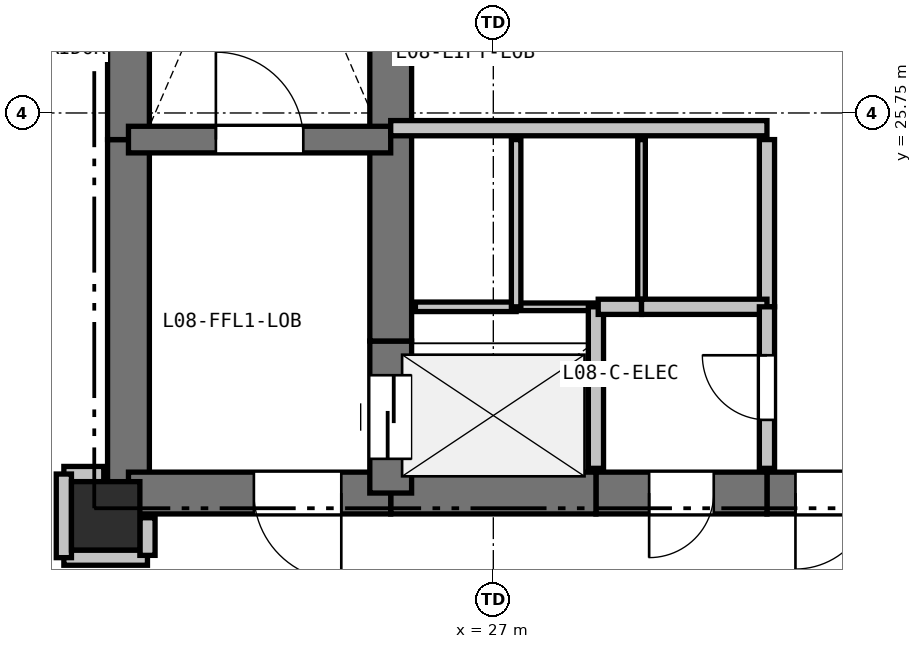
"""IFC4 building model, lengths in metres.
Left out: names, types, materials, properties, quantities, classifications, styles, units other than length and angle.
Written with IfcOpenShell. Run it as: python <this file> out.ifc"""

import sys

from ifc_helpers import new_model, si_unit, direction, frame, frame_2d, origin, origin_2d, place, context, subcontext, project, spatial, rectangle, extrude, element, fill, save


model = new_model("IFC4")
c1 = context("Model", 3, precision=1e-05, world=origin(), true_north=direction((0.0, 1.0)))
c2 = subcontext(c1, "Body", "Model", "MODEL_VIEW")
j1 = project(units=[si_unit("LENGTHUNIT", "METRE"), si_unit("PLANEANGLEUNIT", "RADIAN")], contexts=[c1])
p1 = place(None, origin())
s1 = spatial("IfcSite", under=j1, at=p1, CompositionType="ELEMENT")
p2 = place(p1, origin())
s2 = spatial("IfcBuilding", under=s1, at=p2, CompositionType="ELEMENT")
p3 = place(p2, frame((0.0, 0.0, 32.4)))
s3 = spatial("IfcBuildingStorey", under=s2, at=p3, CompositionType="ELEMENT", Elevation=32.4)
p4 = place(p3, frame((21.9, 20.45, 0.0), z_axis=(0.0, 0.0, 1.0), x_axis=(1.0, 0.0, 0.0)))
e1 = element("IfcColumn", 1, at=p4, inside=s3, PredefinedType="COLUMN", context=c2, shape_type="SweptSolid", body=[
    extrude(rectangle(XDim=0.9, YDim=0.9, at=origin_2d()), origin(), (0.0, 0.0, 1.0), 3.3),
])
p5 = place(p3, frame((22.2, 20.75, 0.0), z_axis=(0.0, 0.0, 1.0), x_axis=(0.0, 1.0, 0.0)))
e2 = element("IfcWall", 2, at=p5, inside=s3, PredefinedType="SHEAR", context=c2, shape_type="SweptSolid", body=[
    extrude(rectangle(XDim=4.65, YDim=0.55, at=frame_2d((2.325, 0.0))), origin(), (0.0, 0.0, 1.0), 3.04),
])
p6 = place(p3, frame((22.2, 25.4, 0.0), z_axis=(0.0, 0.0, 1.0), x_axis=(0.0, 1.0, 0.0)))
e3 = element("IfcWall", 3, at=p6, inside=s3, PredefinedType="SHEAR", context=c2, shape_type="SweptSolid", body=[
    extrude(rectangle(XDim=7.35, YDim=0.55, at=frame_2d((3.675, 0.0))), origin(), (0.0, 0.0, 1.0), 3.04),
])
p7 = place(p3, frame((32.35, 20.75, 0.0), z_axis=(0.0, 0.0, 1.0), x_axis=(-1.0, 0.0, 0.0)))
e4 = element("IfcWall", 4, at=p7, inside=s3, PredefinedType="SHEAR", context=c2, shape_type="SweptSolid", body=[
    extrude(rectangle(XDim=1.75, YDim=0.55, at=frame_2d((0.875, 0.0))), origin(), (0.0, 0.0, 1.0), 3.04),
])
p8 = place(p7, frame((0.375, 0.0, 0.0)))
e5 = element("IfcOpeningElement", 5, at=p8, cuts=e4, PredefinedType="OPENING", context=c2, shape_type="SweptSolid", body=[
    extrude(rectangle(XDim=1.0, YDim=2.15, at=frame_2d((0.5, 1.075))), frame((0.0, 0.285, 0.0), z_axis=(0.0, -1.0, 0.0), x_axis=(1.0, 0.0, 0.0)), (0.0, 0.0, 1.0), 0.57),
])
p9 = place(p3, frame((30.6, 20.75, 0.0), z_axis=(0.0, 0.0, 1.0), x_axis=(-1.0, 0.0, 0.0)))
e6 = element("IfcWall", 6, at=p9, inside=s3, PredefinedType="SHEAR", context=c2, shape_type="SweptSolid", body=[
    extrude(rectangle(XDim=2.25, YDim=0.55, at=frame_2d((1.125, 0.0))), origin(), (0.0, 0.0, 1.0), 3.04),
])
p10 = place(p9, frame((0.7, 0.0, 0.0)))
e7 = element("IfcOpeningElement", 7, at=p10, cuts=e6, PredefinedType="OPENING", context=c2, shape_type="SweptSolid", body=[
    extrude(rectangle(XDim=0.85, YDim=2.1, at=frame_2d((0.425, 1.05))), frame((0.0, 0.285, 0.0), z_axis=(0.0, -1.0, 0.0), x_axis=(1.0, 0.0, 0.0)), (0.0, 0.0, 1.0), 0.57),
])
p11 = place(p3, frame((28.35, 20.75, 0.0), z_axis=(0.0, 0.0, 1.0), x_axis=(-1.0, 0.0, 0.0)))
e8 = element("IfcWall", 8, at=p11, inside=s3, PredefinedType="SHEAR", context=c2, shape_type="SweptSolid", body=[
    extrude(rectangle(XDim=2.7, YDim=0.55, at=frame_2d((1.35, 0.0))), origin(), (0.0, 0.0, 1.0), 3.04),
])
p12 = place(p3, frame((25.65, 20.75, 0.0), z_axis=(0.0, 0.0, 1.0), x_axis=(-1.0, 0.0, 0.0)))
e9 = element("IfcWall", 9, at=p12, inside=s3, PredefinedType="SHEAR", context=c2, shape_type="SweptSolid", body=[
    extrude(rectangle(XDim=3.45, YDim=0.55, at=frame_2d((1.725, 0.0))), origin(), (0.0, 0.0, 1.0), 3.04),
])
p13 = place(p12, frame((0.65, 0.0, 0.0)))
e10 = element("IfcOpeningElement", 10, at=p13, cuts=e9, PredefinedType="OPENING", context=c2, shape_type="SweptSolid", body=[
    extrude(rectangle(XDim=1.15, YDim=2.15, at=frame_2d((0.575, 1.075))), frame((0.0, 0.285, 0.0), z_axis=(0.0, -1.0, 0.0), x_axis=(1.0, 0.0, 0.0)), (0.0, 0.0, 1.0), 0.57),
])
p14 = place(p3, frame((25.65, 20.75, 0.0), z_axis=(0.0, 0.0, 1.0), x_axis=(0.0, 1.0, 0.0)))
e11 = element("IfcWall", 11, at=p14, inside=s3, PredefinedType="SHEAR", context=c2, shape_type="SweptSolid", body=[
    extrude(rectangle(XDim=2.0, YDim=0.55, at=frame_2d((1.0, 0.0))), origin(), (0.0, 0.0, 1.0), 3.04),
])
p15 = place(p14, frame((0.45, 0.0, 0.0)))
e12 = element("IfcOpeningElement", 12, at=p15, cuts=e11, PredefinedType="OPENING", context=c2, shape_type="SweptSolid", body=[
    extrude(rectangle(XDim=1.1, YDim=2.15, at=frame_2d((0.55, 1.075))), frame((0.0, 0.285, 0.0), z_axis=(0.0, -1.0, 0.0), x_axis=(1.0, 0.0, 0.0)), (0.0, 0.0, 1.0), 0.57),
])
p16 = place(p3, frame((25.65, 22.75, 0.0), z_axis=(0.0, 0.0, 1.0), x_axis=(0.0, 1.0, 0.0)))
e13 = element("IfcWall", 13, at=p16, inside=s3, PredefinedType="SHEAR", context=c2, shape_type="SweptSolid", body=[
    extrude(rectangle(XDim=2.8, YDim=0.55, at=frame_2d((1.4, 0.0))), origin(), (0.0, 0.0, 1.0), 3.04),
])
p17 = place(p3, frame((25.65, 25.55, 0.0), z_axis=(0.0, 0.0, 1.0), x_axis=(0.0, 1.0, 0.0)))
e14 = element("IfcWall", 14, at=p17, inside=s3, PredefinedType="SHEAR", context=c2, shape_type="SweptSolid", body=[
    extrude(rectangle(XDim=2.4, YDim=0.55, at=frame_2d((1.2, 0.0))), origin(), (0.0, 0.0, 1.0), 3.04),
])
p18 = place(p3, frame((22.2, 25.4, 0.0), z_axis=(0.0, 0.0, 1.0), x_axis=(1.0, 0.0, 0.0)))
e15 = element("IfcWall", 15, at=p18, inside=s3, PredefinedType="SHEAR", context=c2, shape_type="SweptSolid", body=[
    extrude(rectangle(XDim=3.45, YDim=0.35, at=frame_2d((1.725, 0.0))), origin(), (0.0, 0.0, 1.0), 3.04),
])
p19 = place(p18, frame((1.15, 0.0, 0.0)))
e16 = element("IfcOpeningElement", 16, at=p19, cuts=e15, PredefinedType="OPENING", context=c2, shape_type="SweptSolid", body=[
    extrude(rectangle(XDim=1.15, YDim=2.15, at=frame_2d((0.575, 1.075))), frame((0.0, 0.185, 0.0), z_axis=(0.0, -1.0, 0.0), x_axis=(1.0, 0.0, 0.0)), (0.0, 0.0, 1.0), 0.37),
])
p20 = place(p3, frame((25.65, 25.55, 0.0), z_axis=(0.0, 0.0, 1.0), x_axis=(1.0, 0.0, 0.0)))
e17 = element("IfcWall", 17, at=p20, inside=s3, PredefinedType="PARTITIONING", context=c2, shape_type="SweptSolid", body=[
    extrude(rectangle(XDim=4.95, YDim=0.2, at=frame_2d((2.475, 0.0))), origin(), (0.0, 0.0, 1.0), 3.04),
])
p21 = place(p3, frame((25.975, 23.2, 0.0), z_axis=(0.0, 0.0, 1.0), x_axis=(1.0, 0.0, 0.0)))
e18 = element("IfcWall", 18, at=p21, inside=s3, PredefinedType="PARTITIONING", context=c2, shape_type="SweptSolid", body=[
    extrude(rectangle(XDim=1.325, YDim=0.125, at=frame_2d((0.663, 0.0))), origin(), (0.0, 0.0, 1.0), 3.04),
])
p22 = place(p3, frame((27.3, 23.2, 0.0), z_axis=(0.0, 0.0, 1.0), x_axis=(1.0, 0.0, 0.0)))
e19 = element("IfcWall", 19, at=p22, inside=s3, PredefinedType="PARTITIONING", context=c2, shape_type="SweptSolid", body=[
    extrude(rectangle(XDim=1.05, YDim=0.1, at=frame_2d((0.525, 0.0))), origin(), (0.0, 0.0, 1.0), 3.04),
])
p23 = place(p3, frame((28.35, 23.2, 0.0), z_axis=(0.0, 0.0, 1.0), x_axis=(0.0, -1.0, 0.0)))
e20 = element("IfcWall", 20, at=p23, inside=s3, PredefinedType="PARTITIONING", context=c2, shape_type="SweptSolid", body=[
    extrude(rectangle(XDim=2.125, YDim=0.2, at=frame_2d((1.062, 0.0))), origin(), (0.0, 0.0, 1.0), 3.04),
])
p24 = place(p3, frame((27.3, 25.4, 0.0), z_axis=(0.0, 0.0, 1.0), x_axis=(0.0, -1.0, 0.0)))
e21 = element("IfcWall", 21, at=p24, inside=s3, PredefinedType="PARTITIONING", context=c2, shape_type="SweptSolid", body=[
    extrude(rectangle(XDim=2.2, YDim=0.125, at=frame_2d((1.1, 0.0))), origin(), (0.0, 0.0, 1.0), 3.04),
])
p25 = place(p3, frame((28.95, 25.4, 0.0), z_axis=(0.0, 0.0, 1.0), x_axis=(0.0, -1.0, 0.0)))
e22 = element("IfcWall", 22, at=p25, inside=s3, PredefinedType="PARTITIONING", context=c2, shape_type="SweptSolid", body=[
    extrude(rectangle(XDim=2.2, YDim=0.1, at=frame_2d((1.1, 0.0))), origin(), (0.0, 0.0, 1.0), 3.04),
])
p26 = place(p3, frame((28.95, 23.2, 0.0), z_axis=(0.0, 0.0, 1.0), x_axis=(-1.0, 0.0, 0.0)))
e23 = element("IfcWall", 23, at=p26, inside=s3, PredefinedType="PARTITIONING", context=c2, shape_type="SweptSolid", body=[
    extrude(rectangle(XDim=0.57, YDim=0.2, at=frame_2d((0.285, 0.0))), origin(), (0.0, 0.0, 1.0), 3.04),
])
p27 = place(p3, frame((30.6, 25.4, 0.0), z_axis=(0.0, 0.0, 1.0), x_axis=(0.0, -1.0, 0.0)))
e24 = element("IfcWall", 24, at=p27, inside=s3, PredefinedType="PARTITIONING", context=c2, shape_type="SweptSolid", body=[
    extrude(rectangle(XDim=2.2, YDim=0.2, at=frame_2d((1.1, 0.0))), origin(), (0.0, 0.0, 1.0), 3.04),
])
p28 = place(p3, frame((30.6, 23.2, 0.0), z_axis=(0.0, 0.0, 1.0), x_axis=(-1.0, 0.0, 0.0)))
e25 = element("IfcWall", 25, at=p28, inside=s3, PredefinedType="PARTITIONING", context=c2, shape_type="SweptSolid", body=[
    extrude(rectangle(XDim=1.65, YDim=0.2, at=frame_2d((0.825, 0.0))), origin(), (0.0, 0.0, 1.0), 3.04),
])
p29 = place(p3, frame((30.6, 21.075, 0.0), z_axis=(0.0, 0.0, 1.0), x_axis=(0.0, 1.0, 0.0)))
e26 = element("IfcWall", 26, at=p29, inside=s3, PredefinedType="PARTITIONING", context=c2, shape_type="SweptSolid", body=[
    extrude(rectangle(XDim=2.125, YDim=0.2, at=frame_2d((1.062, 0.0))), origin(), (0.0, 0.0, 1.0), 3.04),
])
p30 = place(p29, frame((0.637, 0.0, 0.0)))
e27 = element("IfcOpeningElement", 27, at=p30, cuts=e26, PredefinedType="OPENING", context=c2, shape_type="SweptSolid", body=[
    extrude(rectangle(XDim=0.85, YDim=2.1, at=frame_2d((0.425, 1.05))), frame((0.0, 0.11, 0.0), z_axis=(0.0, -1.0, 0.0), x_axis=(1.0, 0.0, 0.0)), (0.0, 0.0, 1.0), 0.22),
])
p31 = place(p3, frame((21.35, 19.9, 0.0), z_axis=(0.0, 0.0, 1.0), x_axis=(1.0, 0.0, 0.0)))
e28 = element("IfcWall", 28, at=p31, inside=s3, PredefinedType="PARTITIONING", context=c2, shape_type="SweptSolid", body=[
    extrude(rectangle(XDim=1.1, YDim=0.2, at=frame_2d((0.55, 0.0))), origin(), (0.0, 0.0, 1.0), 2.338),
])
p32 = place(p3, frame((22.45, 19.93, 0.0), z_axis=(0.0, 0.0, 1.0), x_axis=(0.0, 1.0, 0.0)))
e29 = element("IfcWall", 29, at=p32, inside=s3, PredefinedType="PARTITIONING", context=c2, shape_type="SweptSolid", body=[
    extrude(rectangle(XDim=0.495, YDim=0.2, at=frame_2d((0.248, 0.0))), origin(), (0.0, 0.0, 1.0), 2.338),
])
p33 = place(p3, frame((21.875, 21.0, 0.0), z_axis=(0.0, 0.0, 1.0), x_axis=(-1.0, 0.0, 0.0)))
e30 = element("IfcWall", 30, at=p33, inside=s3, PredefinedType="PARTITIONING", context=c2, shape_type="SweptSolid", body=[
    extrude(rectangle(XDim=0.525, YDim=0.2, at=frame_2d((0.262, 0.0))), origin(), (0.0, 0.0, 1.0), 2.488),
])
p34 = place(p3, frame((21.35, 21.0, 0.0), z_axis=(0.0, 0.0, 1.0), x_axis=(0.0, -1.0, 0.0)))
e31 = element("IfcWall", 31, at=p34, inside=s3, PredefinedType="PARTITIONING", context=c2, shape_type="SweptSolid", body=[
    extrude(rectangle(XDim=1.1, YDim=0.2, at=frame_2d((0.55, 0.0))), origin(), (0.0, 0.0, 1.0), 2.338),
])
p35 = place(p8, origin())
e32 = element("IfcDoor", 32, at=p35, inside=s3, OperationType="SINGLE_SWING_RIGHT", PredefinedType="DOOR", context=c2, shape_type="SweptSolid", body=[
    extrude(rectangle(XDim=1.0, YDim=2.15, at=frame_2d((0.5, 1.075))), frame((0.0, 0.025, 0.0), z_axis=(0.0, -1.0, 0.0), x_axis=(1.0, 0.0, 0.0)), (0.0, 0.0, 1.0), 0.05),
])
fill(e5, e32)
p36 = place(p15, origin())
e33 = element("IfcDoor", 33, at=p36, inside=s3, OperationType="SLIDING_TO_LEFT", PredefinedType="DOOR", context=c2, shape_type="SweptSolid", body=[
    extrude(rectangle(XDim=1.1, YDim=2.15, at=frame_2d((0.55, 1.075))), frame((0.0, 0.025, 0.0), z_axis=(0.0, -1.0, 0.0), x_axis=(1.0, 0.0, 0.0)), (0.0, 0.0, 1.0), 0.05),
])
fill(e12, e33)
p37 = place(p19, origin())
e34 = element("IfcDoor", 34, at=p37, inside=s3, OperationType="SINGLE_SWING_LEFT", PredefinedType="DOOR", context=c2, shape_type="SweptSolid", body=[
    extrude(rectangle(XDim=1.15, YDim=2.15, at=frame_2d((0.575, 1.075))), frame((0.0, 0.025, 0.0), z_axis=(0.0, -1.0, 0.0), x_axis=(1.0, 0.0, 0.0)), (0.0, 0.0, 1.0), 0.05),
])
fill(e16, e34)
p38 = place(p13, origin())
e35 = element("IfcDoor", 35, at=p38, inside=s3, OperationType="SINGLE_SWING_LEFT", PredefinedType="DOOR", context=c2, shape_type="SweptSolid", body=[
    extrude(rectangle(XDim=1.15, YDim=2.15, at=frame_2d((0.575, 1.075))), frame((0.0, 0.025, 0.0), z_axis=(0.0, -1.0, 0.0), x_axis=(1.0, 0.0, 0.0)), (0.0, 0.0, 1.0), 0.05),
])
fill(e10, e35)
p39 = place(p30, origin())
e36 = element("IfcDoor", 36, at=p39, inside=s3, OperationType="SINGLE_SWING_RIGHT", PredefinedType="DOOR", context=c2, shape_type="SweptSolid", body=[
    extrude(rectangle(XDim=0.85, YDim=2.1, at=frame_2d((0.425, 1.05))), frame((0.0, 0.025, 0.0), z_axis=(0.0, -1.0, 0.0), x_axis=(1.0, 0.0, 0.0)), (0.0, 0.0, 1.0), 0.05),
])
fill(e27, e36)
p40 = place(p10, origin())
e37 = element("IfcDoor", 37, at=p40, inside=s3, OperationType="SINGLE_SWING_RIGHT", PredefinedType="DOOR", context=c2, shape_type="SweptSolid", body=[
    extrude(rectangle(XDim=0.85, YDim=2.1, at=frame_2d((0.425, 1.05))), frame((0.0, 0.025, 0.0), z_axis=(0.0, -1.0, 0.0), x_axis=(1.0, 0.0, 0.0)), (0.0, 0.0, 1.0), 0.05),
])
fill(e7, e37)
save(model, sys.argv[1])
